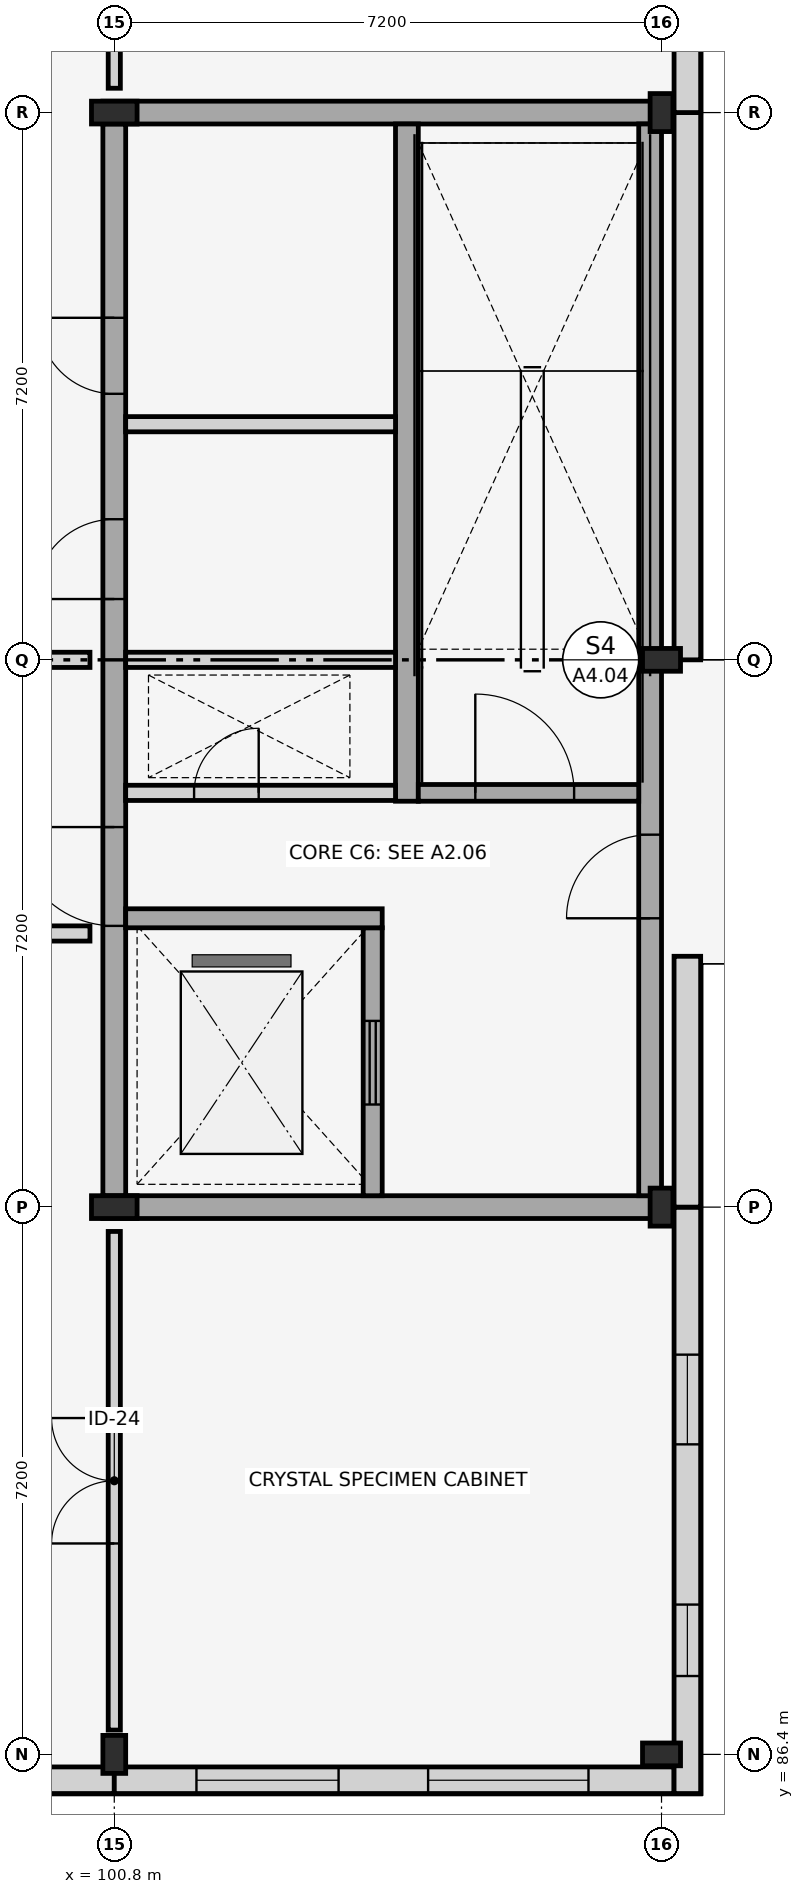
"""IFC4 building model, lengths in metres.
Left out: names, types, materials, properties, quantities, classifications, styles, units other than length and angle.
Written with IfcOpenShell. Run it as: python <this file> out.ifc"""

import sys

from ifc_helpers import new_model, si_unit, direction, frame, frame_2d, origin, origin_2d, place, context, subcontext, project, spatial, rectangle, i_section, extrude, element, fill, save


model = new_model("IFC4")
c1 = context("Model", 3, precision=1e-05, world=origin(), true_north=direction((0.0, 1.0)))
c2 = subcontext(c1, "Body", "Model", "MODEL_VIEW")
j1 = project(units=[si_unit("LENGTHUNIT", "METRE"), si_unit("PLANEANGLEUNIT", "RADIAN")], contexts=[c1])
p1 = place(None, origin())
s1 = spatial("IfcSite", under=j1, at=p1, CompositionType="ELEMENT")
p2 = place(p1, origin())
s2 = spatial("IfcBuilding", under=s1, at=p2, CompositionType="ELEMENT")
p3 = place(p2, origin())
s3 = spatial("IfcBuildingStorey", under=s2, at=p3, CompositionType="ELEMENT", Elevation=0.0)
p4 = place(p3, frame((100.8, 86.4, 0.0), z_axis=(0.0, 0.0, 1.0), x_axis=(1.0, 0.0, 0.0)))
e1 = element("IfcColumn", 1, at=p4, inside=s3, PredefinedType="COLUMN", context=c2, shape_type="SweptSolid", body=[
    extrude(i_section(OverallWidth=0.3, OverallDepth=0.5, WebThickness=0.014, FlangeThickness=0.028, FilletRadius=0.027, at=origin_2d()), origin(), (0.0, 0.0, 1.0), 4.5),
])
for number, where, z_axis, x_axis in (
    (2, (100.8, 93.6, 0.0), (0.0, 0.0, 1.0), (0.0, 1.0, 0.0)),
    (3, (100.8, 108.0, 0.0), (0.0, 0.0, 1.0), (0.0, 1.0, 0.0)),
):
    element("IfcColumn", number, at=place(p3, frame(where, z_axis=z_axis, x_axis=x_axis)), inside=s3, PredefinedType="COLUMN", context=c2, shape_type="SweptSolid", body=[
        extrude(i_section(OverallWidth=0.3, OverallDepth=0.6, WebThickness=0.015, FlangeThickness=0.03, FilletRadius=0.027, at=origin_2d()), origin(), (0.0, 0.0, 1.0), 4.5),
    ])
for number, where, z_axis, x_axis in (
    (4, (108.0, 86.4, 0.0), (0.0, 0.0, 1.0), (0.0, 1.0, 0.0)),
    (5, (108.0, 93.6, 0.0), (0.0, 0.0, 1.0), (1.0, 0.0, 0.0)),
    (6, (108.0, 100.8, 0.0), (0.0, 0.0, 1.0), (0.0, 1.0, 0.0)),
    (7, (108.0, 108.0, 0.0), (0.0, 0.0, 1.0), (1.0, 0.0, 0.0)),
):
    element("IfcColumn", number, at=place(p3, frame(where, z_axis=z_axis, x_axis=x_axis)), inside=s3, PredefinedType="COLUMN", context=c2, shape_type="SweptSolid", body=[
        extrude(i_section(OverallWidth=0.3, OverallDepth=0.5, WebThickness=0.014, FlangeThickness=0.028, FilletRadius=0.027, at=origin_2d()), origin(), (0.0, 0.0, 1.0), 4.5),
    ])
p5 = place(p3, frame((93.6, 86.06, 0.0), z_axis=(0.0, 0.0, 1.0), x_axis=(1.0, 0.0, 0.0)))
e8 = element("IfcWall", 8, at=p5, inside=s3, PredefinedType="STANDARD", context=c2, shape_type="SweptSolid", body=[
    extrude(rectangle(XDim=7.2, YDim=0.35, at=frame_2d((3.6, 0.0))), origin(), (0.0, 0.0, 1.0), 4.5),
])
p6 = place(p5, frame((1.321, 0.0, 0.9)))
e9 = element("IfcOpeningElement", 9, at=p6, cuts=e8, PredefinedType="OPENING", context=c2, shape_type="SweptSolid", body=[
    extrude(rectangle(XDim=1.39, YDim=1.68, at=frame_2d((0.695, 0.84))), frame((0.0, 0.185, 0.0), z_axis=(0.0, -1.0, 0.0), x_axis=(1.0, 0.0, 0.0)), (0.0, 0.0, 1.0), 0.37),
])
p7 = place(p5, frame((4.369, 0.0, 0.9)))
e10 = element("IfcOpeningElement", 10, at=p7, cuts=e8, PredefinedType="OPENING", context=c2, shape_type="SweptSolid", body=[
    extrude(rectangle(XDim=1.63, YDim=1.68, at=frame_2d((0.815, 0.84))), frame((0.0, 0.185, 0.0), z_axis=(0.0, -1.0, 0.0), x_axis=(1.0, 0.0, 0.0)), (0.0, 0.0, 1.0), 0.37),
])
p8 = place(p3, frame((100.8, 86.06, 0.0), z_axis=(0.0, 0.0, 1.0), x_axis=(1.0, 0.0, 0.0)))
e11 = element("IfcWall", 11, at=p8, inside=s3, PredefinedType="STANDARD", context=c2, shape_type="SweptSolid", body=[
    extrude(rectangle(XDim=7.365, YDim=0.35, at=frame_2d((3.683, 0.0))), origin(), (0.0, 0.0, 1.0), 4.5),
])
p9 = place(p8, frame((1.081, 0.0, 0.9)))
e12 = element("IfcOpeningElement", 12, at=p9, cuts=e11, PredefinedType="OPENING", context=c2, shape_type="SweptSolid", body=[
    extrude(rectangle(XDim=1.87, YDim=1.68, at=frame_2d((0.935, 0.84))), frame((0.0, 0.185, 0.0), z_axis=(0.0, -1.0, 0.0), x_axis=(1.0, 0.0, 0.0)), (0.0, 0.0, 1.0), 0.37),
])
p10 = place(p8, frame((4.129, 0.0, 0.9)))
e13 = element("IfcOpeningElement", 13, at=p10, cuts=e11, PredefinedType="OPENING", context=c2, shape_type="SweptSolid", body=[
    extrude(rectangle(XDim=2.11, YDim=1.68, at=frame_2d((1.055, 0.84))), frame((0.0, 0.185, 0.0), z_axis=(0.0, -1.0, 0.0), x_axis=(1.0, 0.0, 0.0)), (0.0, 0.0, 1.0), 0.37),
])
p11 = place(p3, frame((108.34, 85.885, 0.0), z_axis=(0.0, 0.0, 1.0), x_axis=(0.0, 1.0, 0.0)))
e14 = element("IfcWall", 14, at=p11, inside=s3, PredefinedType="STANDARD", context=c2, shape_type="SweptSolid", body=[
    extrude(rectangle(XDim=7.715, YDim=0.35, at=frame_2d((3.857, 0.0))), origin(), (0.0, 0.0, 1.0), 4.5),
])
p12 = place(p11, frame((1.546, 0.0, 0.9)))
e15 = element("IfcOpeningElement", 15, at=p12, cuts=e14, PredefinedType="OPENING", context=c2, shape_type="SweptSolid", body=[
    extrude(rectangle(XDim=0.94, YDim=1.82, at=frame_2d((0.47, 0.91))), frame((0.0, 0.185, 0.0), z_axis=(0.0, -1.0, 0.0), x_axis=(1.0, 0.0, 0.0)), (0.0, 0.0, 1.0), 0.37),
])
p13 = place(p11, frame((4.594, 0.0, 0.9)))
e16 = element("IfcOpeningElement", 16, at=p13, cuts=e14, PredefinedType="OPENING", context=c2, shape_type="SweptSolid", body=[
    extrude(rectangle(XDim=1.18, YDim=1.82, at=frame_2d((0.59, 0.91))), frame((0.0, 0.185, 0.0), z_axis=(0.0, -1.0, 0.0), x_axis=(1.0, 0.0, 0.0)), (0.0, 0.0, 1.0), 0.37),
])
p14 = place(p3, frame((108.34, 93.6, 0.0), z_axis=(0.0, 0.0, 1.0), x_axis=(0.0, 1.0, 0.0)))
e17 = element("IfcWall", 17, at=p14, inside=s3, PredefinedType="STANDARD", context=c2, shape_type="SweptSolid", body=[
    extrude(rectangle(XDim=3.3, YDim=0.35, at=frame_2d((1.65, 0.0))), origin(), (0.0, 0.0, 1.0), 4.5),
])
p15 = place(p3, frame((108.34, 100.8, 0.0), z_axis=(0.0, 0.0, 1.0), x_axis=(0.0, 1.0, 0.0)))
e18 = element("IfcWall", 18, at=p15, inside=s3, PredefinedType="STANDARD", context=c2, shape_type="SweptSolid", body=[
    extrude(rectangle(XDim=7.2, YDim=0.35, at=frame_2d((3.6, 0.0))), origin(), (0.0, 0.0, 1.0), 4.5),
])
p16 = place(p3, frame((108.34, 108.0, 0.0), z_axis=(0.0, 0.0, 1.0), x_axis=(0.0, 1.0, 0.0)))
e19 = element("IfcWall", 19, at=p16, inside=s3, PredefinedType="STANDARD", context=c2, shape_type="SweptSolid", body=[
    extrude(rectangle(XDim=7.715, YDim=0.35, at=frame_2d((3.857, 0.0))), origin(), (0.0, 0.0, 1.0), 4.5),
])
p17 = place(p16, frame((1.531, 0.0, 0.9)))
e20 = element("IfcOpeningElement", 20, at=p17, cuts=e19, PredefinedType="OPENING", context=c2, shape_type="SweptSolid", body=[
    extrude(rectangle(XDim=0.97, YDim=1.96, at=frame_2d((0.485, 0.98))), frame((0.0, 0.185, 0.0), z_axis=(0.0, -1.0, 0.0), x_axis=(1.0, 0.0, 0.0)), (0.0, 0.0, 1.0), 0.37),
])
p18 = place(p16, frame((4.579, 0.0, 0.9)))
e21 = element("IfcOpeningElement", 21, at=p18, cuts=e19, PredefinedType="OPENING", context=c2, shape_type="SweptSolid", body=[
    extrude(rectangle(XDim=1.21, YDim=1.96, at=frame_2d((0.605, 0.98))), frame((0.0, 0.185, 0.0), z_axis=(0.0, -1.0, 0.0), x_axis=(1.0, 0.0, 0.0)), (0.0, 0.0, 1.0), 0.37),
])
for number, where, z_axis, x_axis in (
    (22, (100.65, 93.6, 0.0), (0.0, 0.0, 1.0), (1.0, 0.0, 0.0)),
    (23, (100.65, 108.0, 0.0), (0.0, 0.0, 1.0), (1.0, 0.0, 0.0)),
):
    element("IfcWall", number, at=place(p3, frame(where, z_axis=z_axis, x_axis=x_axis)), inside=s3, PredefinedType="SHEAR", context=c2, shape_type="SweptSolid", body=[
        extrude(rectangle(XDim=7.35, YDim=0.3, at=frame_2d((3.675, 0.0))), origin(), (0.0, 0.0, 1.0), 4.28),
    ])
p19 = place(p3, frame((107.85, 93.75, 0.0), z_axis=(0.0, 0.0, 1.0), x_axis=(0.0, 1.0, 0.0)))
e24 = element("IfcWall", 24, at=p19, inside=s3, PredefinedType="SHEAR", context=c2, shape_type="SweptSolid", body=[
    extrude(rectangle(XDim=7.05, YDim=0.3, at=frame_2d((3.525, 0.0))), origin(), (0.0, 0.0, 1.0), 4.28),
])
p20 = place(p19, frame((3.65, 0.0, 0.0)))
e25 = element("IfcOpeningElement", 25, at=p20, cuts=e24, PredefinedType="OPENING", context=c2, shape_type="SweptSolid", body=[
    extrude(rectangle(XDim=1.1, YDim=2.2, at=frame_2d((0.55, 1.1))), frame((0.0, 0.16, 0.0), z_axis=(0.0, -1.0, 0.0), x_axis=(1.0, 0.0, 0.0)), (0.0, 0.0, 1.0), 0.32),
])
p21 = place(p3, frame((107.85, 100.8, 0.0), z_axis=(0.0, 0.0, 1.0), x_axis=(0.0, 1.0, 0.0)))
e26 = element("IfcWall", 26, at=p21, inside=s3, PredefinedType="SHEAR", context=c2, shape_type="SweptSolid", body=[
    extrude(rectangle(XDim=7.05, YDim=0.3, at=frame_2d((3.525, 0.0))), origin(), (0.0, 0.0, 1.0), 4.28),
])
p22 = place(p3, frame((100.8, 93.75, 0.0), z_axis=(0.0, 0.0, 1.0), x_axis=(0.0, 1.0, 0.0)))
e27 = element("IfcWall", 27, at=p22, inside=s3, PredefinedType="SHEAR", context=c2, shape_type="SweptSolid", body=[
    extrude(rectangle(XDim=14.1, YDim=0.3, at=frame_2d((7.05, 0.0))), origin(), (0.0, 0.0, 1.0), 4.28),
])
p23 = place(p22, frame((3.55, 0.0, 0.0)))
e28 = element("IfcOpeningElement", 28, at=p23, cuts=e27, PredefinedType="OPENING", context=c2, shape_type="SweptSolid", body=[
    extrude(rectangle(XDim=1.3, YDim=2.2, at=frame_2d((0.65, 1.1))), frame((0.0, 0.16, 0.0), z_axis=(0.0, -1.0, 0.0), x_axis=(1.0, 0.0, 0.0)), (0.0, 0.0, 1.0), 0.32),
])
p24 = place(p22, frame((7.85, 0.0, 0.0)))
e29 = element("IfcOpeningElement", 29, at=p24, cuts=e27, PredefinedType="OPENING", context=c2, shape_type="SweptSolid", body=[
    extrude(rectangle(XDim=1.05, YDim=2.15, at=frame_2d((0.525, 1.075))), frame((0.0, 0.16, 0.0), z_axis=(0.0, -1.0, 0.0), x_axis=(1.0, 0.0, 0.0)), (0.0, 0.0, 1.0), 0.32),
])
p25 = place(p22, frame((10.55, 0.0, 0.0)))
e30 = element("IfcOpeningElement", 30, at=p25, cuts=e27, PredefinedType="OPENING", context=c2, shape_type="SweptSolid", body=[
    extrude(rectangle(XDim=1.0, YDim=2.15, at=frame_2d((0.5, 1.075))), frame((0.0, 0.16, 0.0), z_axis=(0.0, -1.0, 0.0), x_axis=(1.0, 0.0, 0.0)), (0.0, 0.0, 1.0), 0.32),
])
p26 = place(p3, frame((104.2, 93.75, 0.0), z_axis=(0.0, 0.0, 1.0), x_axis=(0.0, 1.0, 0.0)))
e31 = element("IfcWall", 31, at=p26, inside=s3, PredefinedType="SHEAR", context=c2, shape_type="SweptSolid", body=[
    extrude(rectangle(XDim=3.525, YDim=0.25, at=frame_2d((1.762, 0.0))), origin(), (0.0, 0.0, 1.0), 4.28),
])
p27 = place(p26, frame((1.2, 0.0, 0.0)))
e32 = element("IfcOpeningElement", 32, at=p27, cuts=e31, PredefinedType="OPENING", context=c2, shape_type="SweptSolid", body=[
    extrude(rectangle(XDim=1.1, YDim=2.15, at=frame_2d((0.55, 1.075))), frame((0.0, 0.135, 0.0), z_axis=(0.0, -1.0, 0.0), x_axis=(1.0, 0.0, 0.0)), (0.0, 0.0, 1.0), 0.27),
])
p28 = place(p3, frame((104.65, 98.94, 0.0), z_axis=(0.0, 0.0, 1.0), x_axis=(0.0, 1.0, 0.0)))
e33 = element("IfcWall", 33, at=p28, inside=s3, PredefinedType="SHEAR", context=c2, shape_type="SweptSolid", body=[
    extrude(rectangle(XDim=8.91, YDim=0.3, at=frame_2d((4.455, 0.0))), origin(), (0.0, 0.0, 1.0), 4.28),
])
p29 = place(p3, frame((100.95, 99.05, 0.0), z_axis=(0.0, 0.0, 1.0), x_axis=(1.0, 0.0, 0.0)))
e34 = element("IfcWall", 34, at=p29, inside=s3, PredefinedType="PLUMBINGWALL", context=c2, shape_type="SweptSolid", body=[
    extrude(rectangle(XDim=3.55, YDim=0.2, at=frame_2d((1.775, 0.0))), origin(), (0.0, 0.0, 1.0), 3.7),
])
p30 = place(p29, frame((0.9, 0.0, 0.0)))
e35 = element("IfcOpeningElement", 35, at=p30, cuts=e34, PredefinedType="OPENING", context=c2, shape_type="SweptSolid", body=[
    extrude(rectangle(XDim=0.85, YDim=2.05, at=frame_2d((0.425, 1.025))), frame((0.0, 0.11, 0.0), z_axis=(0.0, -1.0, 0.0), x_axis=(1.0, 0.0, 0.0)), (0.0, 0.0, 1.0), 0.22),
])
p31 = place(p3, frame((104.8, 99.05, 0.0), z_axis=(0.0, 0.0, 1.0), x_axis=(1.0, 0.0, 0.0)))
e36 = element("IfcWall", 36, at=p31, inside=s3, PredefinedType="SHEAR", context=c2, shape_type="SweptSolid", body=[
    extrude(rectangle(XDim=2.9, YDim=0.22, at=frame_2d((1.45, 0.0))), origin(), (0.0, 0.0, 1.0), 4.28),
])
p32 = place(p31, frame((0.75, 0.0, 0.0)))
e37 = element("IfcOpeningElement", 37, at=p32, cuts=e36, PredefinedType="OPENING", context=c2, shape_type="SweptSolid", body=[
    extrude(rectangle(XDim=1.3, YDim=2.2, at=frame_2d((0.65, 1.1))), frame((0.0, 0.12, 0.0), z_axis=(0.0, -1.0, 0.0), x_axis=(1.0, 0.0, 0.0)), (0.0, 0.0, 1.0), 0.24),
])
p33 = place(p3, frame((100.95, 97.4, 0.0), z_axis=(0.0, 0.0, 1.0), x_axis=(1.0, 0.0, 0.0)))
e38 = element("IfcWall", 38, at=p33, inside=s3, PredefinedType="SHEAR", context=c2, shape_type="SweptSolid", body=[
    extrude(rectangle(XDim=3.375, YDim=0.25, at=frame_2d((1.688, 0.0))), origin(), (0.0, 0.0, 1.0), 4.28),
])
for number, where, z_axis, x_axis in (
    (39, (100.95, 100.8, 0.0), (0.0, 0.0, 1.0), (1.0, 0.0, 0.0)),
    (40, (100.95, 103.9, 0.0), (0.0, 0.0, 1.0), (1.0, 0.0, 0.0)),
):
    element("IfcWall", number, at=place(p3, frame(where, z_axis=z_axis, x_axis=x_axis)), inside=s3, PredefinedType="PLUMBINGWALL", context=c2, shape_type="SweptSolid", body=[
        extrude(rectangle(XDim=3.55, YDim=0.2, at=frame_2d((1.775, 0.0))), origin(), (0.0, 0.0, 1.0), 3.7),
    ])
p34 = place(p3, frame((83.12, 97.2, 0.0), z_axis=(0.0, 0.0, 1.0), x_axis=(1.0, 0.0, 0.0)))
e41 = element("IfcWall", 41, at=p34, inside=s3, PredefinedType="PARTITIONING", context=c2, shape_type="SweptSolid", body=[
    extrude(rectangle(XDim=17.36, YDim=0.2, at=frame_2d((8.68, 0.0))), origin(), (0.0, 0.0, 1.0), 3.45),
])
p35 = place(p34, frame((7.88, 0.0, 0.0)))
e42 = element("IfcOpeningElement", 42, at=p35, cuts=e41, PredefinedType="OPENING", context=c2, shape_type="SweptSolid", body=[
    extrude(rectangle(XDim=1.6, YDim=2.35, at=frame_2d((0.8, 1.175))), frame((0.0, 0.11, 0.0), z_axis=(0.0, -1.0, 0.0), x_axis=(1.0, 0.0, 0.0)), (0.0, 0.0, 1.0), 0.22),
])
p36 = place(p3, frame((93.92, 100.8, 0.0), z_axis=(0.0, 0.0, 1.0), x_axis=(1.0, 0.0, 0.0)))
e43 = element("IfcWall", 43, at=p36, inside=s3, PredefinedType="PARTITIONING", context=c2, shape_type="SweptSolid", body=[
    extrude(rectangle(XDim=6.56, YDim=0.2, at=frame_2d((3.28, 0.0))), origin(), (0.0, 0.0, 1.0), 3.45),
])
p37 = place(p36, frame((2.53, 0.0, 0.0)))
e44 = element("IfcOpeningElement", 44, at=p37, cuts=e43, PredefinedType="OPENING", context=c2, shape_type="SweptSolid", body=[
    extrude(rectangle(XDim=1.5, YDim=2.25, at=frame_2d((0.75, 1.125))), frame((0.0, 0.11, 0.0), z_axis=(0.0, -1.0, 0.0), x_axis=(1.0, 0.0, 0.0)), (0.0, 0.0, 1.0), 0.22),
])
p38 = place(p3, frame((100.8, 86.72, 0.0), z_axis=(0.0, 0.0, 1.0), x_axis=(0.0, 1.0, 0.0)))
e45 = element("IfcWall", 45, at=p38, inside=s3, PredefinedType="PARTITIONING", context=c2, shape_type="SweptSolid", body=[
    extrude(rectangle(XDim=6.56, YDim=0.16, at=frame_2d((3.28, 0.0))), origin(), (0.0, 0.0, 1.0), 3.45),
])
p39 = place(p38, frame((2.455, 0.0, 0.0)))
e46 = element("IfcOpeningElement", 46, at=p39, cuts=e45, PredefinedType="OPENING", context=c2, shape_type="SweptSolid", body=[
    extrude(rectangle(XDim=1.65, YDim=2.45, at=frame_2d((0.825, 1.225))), frame((0.0, 0.09, 0.0), z_axis=(0.0, -1.0, 0.0), x_axis=(1.0, 0.0, 0.0)), (0.0, 0.0, 1.0), 0.18),
])
p40 = place(p3, frame((100.8, 108.32, 0.0), z_axis=(0.0, 0.0, 1.0), x_axis=(0.0, 1.0, 0.0)))
e47 = element("IfcWall", 47, at=p40, inside=s3, PredefinedType="PARTITIONING", context=c2, shape_type="SweptSolid", body=[
    extrude(rectangle(XDim=6.56, YDim=0.16, at=frame_2d((3.28, 0.0))), origin(), (0.0, 0.0, 1.0), 3.45),
])
p41 = place(p40, frame((2.205, 0.0, 0.0)))
e48 = element("IfcOpeningElement", 48, at=p41, cuts=e47, PredefinedType="OPENING", context=c2, shape_type="SweptSolid", body=[
    extrude(rectangle(XDim=2.15, YDim=2.65, at=frame_2d((1.075, 1.325))), frame((0.0, 0.09, 0.0), z_axis=(0.0, -1.0, 0.0), x_axis=(1.0, 0.0, 0.0)), (0.0, 0.0, 1.0), 0.18),
])
p42 = place(p9, origin())
e49 = element("IfcWindow", 49, at=p42, inside=s3, PartitioningType="SINGLE_PANEL", PredefinedType="WINDOW", context=c2, shape_type="SweptSolid", body=[
    extrude(rectangle(XDim=1.87, YDim=1.68, at=frame_2d((0.935, 0.84))), frame((0.0, 0.03, 0.0), z_axis=(0.0, -1.0, 0.0), x_axis=(1.0, 0.0, 0.0)), (0.0, 0.0, 1.0), 0.06),
])
fill(e12, e49)
p43 = place(p10, origin())
e50 = element("IfcWindow", 50, at=p43, inside=s3, PartitioningType="SINGLE_PANEL", PredefinedType="WINDOW", context=c2, shape_type="SweptSolid", body=[
    extrude(rectangle(XDim=2.11, YDim=1.68, at=frame_2d((1.055, 0.84))), frame((0.0, 0.03, 0.0), z_axis=(0.0, -1.0, 0.0), x_axis=(1.0, 0.0, 0.0)), (0.0, 0.0, 1.0), 0.06),
])
fill(e13, e50)
p44 = place(p12, origin())
e51 = element("IfcWindow", 51, at=p44, inside=s3, PartitioningType="SINGLE_PANEL", PredefinedType="WINDOW", context=c2, shape_type="SweptSolid", body=[
    extrude(rectangle(XDim=0.94, YDim=1.82, at=frame_2d((0.47, 0.91))), frame((0.0, 0.03, 0.0), z_axis=(0.0, -1.0, 0.0), x_axis=(1.0, 0.0, 0.0)), (0.0, 0.0, 1.0), 0.06),
])
fill(e15, e51)
p45 = place(p13, origin())
e52 = element("IfcWindow", 52, at=p45, inside=s3, PartitioningType="SINGLE_PANEL", PredefinedType="WINDOW", context=c2, shape_type="SweptSolid", body=[
    extrude(rectangle(XDim=1.18, YDim=1.82, at=frame_2d((0.59, 0.91))), frame((0.0, 0.03, 0.0), z_axis=(0.0, -1.0, 0.0), x_axis=(1.0, 0.0, 0.0)), (0.0, 0.0, 1.0), 0.06),
])
fill(e16, e52)
p46 = place(p20, origin())
e53 = element("IfcDoor", 53, at=p46, inside=s3, OperationType="SINGLE_SWING_LEFT", PredefinedType="DOOR", context=c2, shape_type="SweptSolid", body=[
    extrude(rectangle(XDim=1.1, YDim=2.2, at=frame_2d((0.55, 1.1))), frame((0.0, 0.025, 0.0), z_axis=(0.0, -1.0, 0.0), x_axis=(1.0, 0.0, 0.0)), (0.0, 0.0, 1.0), 0.05),
])
fill(e25, e53)
p47 = place(p23, origin())
e54 = element("IfcDoor", 54, at=p47, inside=s3, OperationType="SINGLE_SWING_RIGHT", PredefinedType="DOOR", context=c2, shape_type="SweptSolid", body=[
    extrude(rectangle(XDim=1.3, YDim=2.2, at=frame_2d((0.65, 1.1))), frame((0.0, 0.025, 0.0), z_axis=(0.0, -1.0, 0.0), x_axis=(1.0, 0.0, 0.0)), (0.0, 0.0, 1.0), 0.05),
])
fill(e28, e54)
p48 = place(p24, origin())
e55 = element("IfcDoor", 55, at=p48, inside=s3, OperationType="SINGLE_SWING_LEFT", PredefinedType="DOOR", context=c2, shape_type="SweptSolid", body=[
    extrude(rectangle(XDim=1.05, YDim=2.15, at=frame_2d((0.525, 1.075))), frame((0.0, 0.025, 0.0), z_axis=(0.0, -1.0, 0.0), x_axis=(1.0, 0.0, 0.0)), (0.0, 0.0, 1.0), 0.05),
])
fill(e29, e55)
p49 = place(p25, origin())
e56 = element("IfcDoor", 56, at=p49, inside=s3, OperationType="SINGLE_SWING_RIGHT", PredefinedType="DOOR", context=c2, shape_type="SweptSolid", body=[
    extrude(rectangle(XDim=1.0, YDim=2.15, at=frame_2d((0.5, 1.075))), frame((0.0, 0.025, 0.0), z_axis=(0.0, -1.0, 0.0), x_axis=(1.0, 0.0, 0.0)), (0.0, 0.0, 1.0), 0.05),
])
fill(e30, e56)
p50 = place(p27, origin())
e57 = element("IfcDoor", 57, at=p50, inside=s3, OperationType="SLIDING_TO_LEFT", PredefinedType="DOOR", context=c2, shape_type="SweptSolid", body=[
    extrude(rectangle(XDim=1.1, YDim=2.15, at=frame_2d((0.55, 1.075))), frame((0.0, 0.025, 0.0), z_axis=(0.0, -1.0, 0.0), x_axis=(1.0, 0.0, 0.0)), (0.0, 0.0, 1.0), 0.05),
])
fill(e32, e57)
p51 = place(p30, origin())
e58 = element("IfcDoor", 58, at=p51, inside=s3, OperationType="SINGLE_SWING_RIGHT", PredefinedType="TRAPDOOR", context=c2, shape_type="SweptSolid", body=[
    extrude(rectangle(XDim=0.85, YDim=2.05, at=frame_2d((0.425, 1.025))), frame((0.0, 0.025, 0.0), z_axis=(0.0, -1.0, 0.0), x_axis=(1.0, 0.0, 0.0)), (0.0, 0.0, 1.0), 0.05),
])
fill(e35, e58)
p52 = place(p32, origin())
e59 = element("IfcDoor", 59, at=p52, inside=s3, OperationType="SINGLE_SWING_LEFT", PredefinedType="DOOR", context=c2, shape_type="SweptSolid", body=[
    extrude(rectangle(XDim=1.3, YDim=2.2, at=frame_2d((0.65, 1.1))), frame((0.0, 0.025, 0.0), z_axis=(0.0, -1.0, 0.0), x_axis=(1.0, 0.0, 0.0)), (0.0, 0.0, 1.0), 0.05),
])
fill(e37, e59)
p53 = place(p39, origin())
e60 = element("IfcDoor", 60, at=p53, inside=s3, OperationType="DOUBLE_DOOR_SINGLE_SWING", PredefinedType="DOOR", context=c2, shape_type="SweptSolid", body=[
    extrude(rectangle(XDim=1.65, YDim=2.45, at=frame_2d((0.825, 1.225))), frame((0.0, 0.025, 0.0), z_axis=(0.0, -1.0, 0.0), x_axis=(1.0, 0.0, 0.0)), (0.0, 0.0, 1.0), 0.05),
])
fill(e46, e60)
save(model, sys.argv[1])
